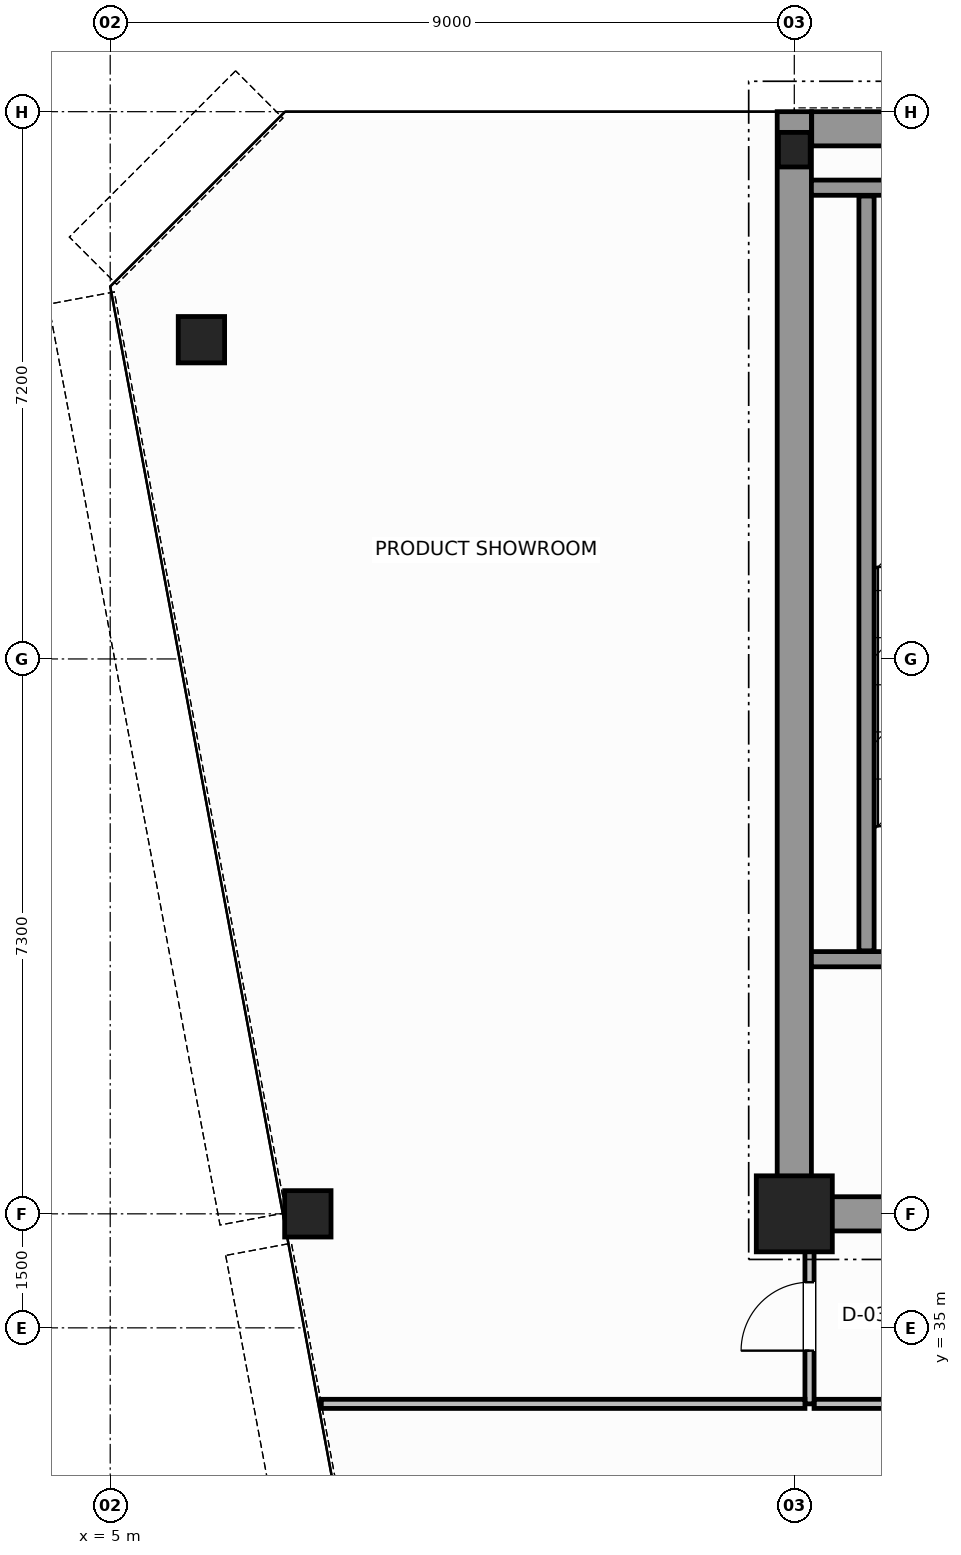
"""IFC4 building model, lengths in metres.
Left out: names, types, materials, properties, quantities, classifications, styles, units other than length and angle.
Written with IfcOpenShell. Run it as: python <this file> out.ifc"""

import sys

from ifc_helpers import new_model, si_unit, direction, frame, frame_2d, origin, origin_2d, place, context, subcontext, project, spatial, rectangle, hollow_circle, i_section, extrude, source, transform, mapped, element, fill, save


model = new_model("IFC4")
c1 = context("Model", 3, precision=1e-05, world=origin(), true_north=direction((0.0, 1.0)))
c2 = subcontext(c1, "Body", "Model", "MODEL_VIEW")
j1 = project(units=[si_unit("LENGTHUNIT", "METRE"), si_unit("PLANEANGLEUNIT", "RADIAN")], contexts=[c1])
p1 = place(None, origin())
s1 = spatial("IfcSite", under=j1, at=p1, CompositionType="ELEMENT")
p2 = place(p1, origin())
s2 = spatial("IfcBuilding", under=s1, at=p2, CompositionType="ELEMENT")
p3 = place(p2, frame((0.0, 0.0, 257.4)))
s3 = spatial("IfcBuildingStorey", under=s2, at=p3, CompositionType="ELEMENT", Elevation=257.4)
m1 = source(origin(), c2, "Body", "SweptSolid", [
    extrude(rectangle(XDim=1.0, YDim=1.0, at=origin_2d()), origin(), (0.0, 0.0, 1.0), 3.8),
])
p4 = place(p3, frame((14.0, 36.5, 0.0), z_axis=(0.0, 0.0, 1.0), x_axis=(1.0, 0.0, 0.0)))
e1 = element("IfcColumn", 1, at=p4, inside=s3, PredefinedType="COLUMN", context=c2, shape_type="MappedRepresentation", body=[
    mapped(m1, transform((0.0, 0.0, 0.0), scale=1.0)),
])
m2 = source(origin(), c2, "Body", "SweptSolid", [
    extrude(i_section(OverallWidth=0.418, OverallDepth=0.455, WebThickness=0.042, FlangeThickness=0.058, FilletRadius=0.015, at=origin_2d()), origin(), (0.0, 0.0, 1.0), 3.8),
])
p5 = place(p3, frame((14.0, 50.5, 0.0), z_axis=(0.0, 0.0, 1.0), x_axis=(1.0, 0.0, 0.0)))
e2 = element("IfcColumn", 2, at=p5, inside=s3, PredefinedType="COLUMN", context=c2, shape_type="MappedRepresentation", body=[
    mapped(m2, transform((0.0, 0.0, 0.0), scale=1.0)),
])
m3 = source(origin(), c2, "Body", "SweptSolid", [
    extrude(hollow_circle(Radius=0.305, WallThickness=0.03, at=origin_2d()), origin(), (0.0, 0.0, 1.0), 3.8),
])
for number, where, z_axis, x_axis in (
    (3, (6.2, 48.0, 0.0), (0.0, 0.0, 1.0), (1.0, 0.0, 0.0)),
    (4, (7.6, 36.5, 0.0), (0.0, 0.0, 1.0), (1.0, 0.0, 0.0)),
):
    element("IfcColumn", number, at=place(p3, frame(where, z_axis=z_axis, x_axis=x_axis)), inside=s3, PredefinedType="COLUMN", context=c2, shape_type="MappedRepresentation", body=[
        mapped(m3, transform((0.0, 0.0, 0.0), scale=1.0)),
    ])
p6 = place(p3, frame((14.229, 50.775, 0.0), z_axis=(0.0, 0.0, 1.0), x_axis=(1.0, 0.0, 0.0)))
e5 = element("IfcWall", 5, at=p6, inside=s3, PredefinedType="SHEAR", context=c2, shape_type="SweptSolid", body=[
    extrude(rectangle(XDim=19.769, YDim=0.45, at=frame_2d((9.885, 0.0))), origin(), (0.0, 0.0, 1.0), 3.8),
])
p7 = place(p3, frame((14.0, 36.5, 0.0), z_axis=(0.0, 0.0, 1.0), x_axis=(0.0, 1.0, 0.0)))
e6 = element("IfcWall", 6, at=p7, inside=s3, PredefinedType="SHEAR", context=c2, shape_type="SweptSolid", body=[
    extrude(rectangle(XDim=14.5, YDim=0.45, at=frame_2d((7.25, 0.0))), origin(), (0.0, 0.0, 1.0), 3.8),
])
p8 = place(p3, frame((14.245, 36.5, 0.0), z_axis=(0.0, 0.0, 1.0), x_axis=(1.0, 0.0, 0.0)))
e7 = element("IfcWall", 7, at=p8, inside=s3, PredefinedType="SHEAR", context=c2, shape_type="SweptSolid", body=[
    extrude(rectangle(XDim=3.955, YDim=0.45, at=frame_2d((1.978, 0.0))), origin(), (0.0, 0.0, 1.0), 2.58),
])
p9 = place(p3, frame((14.225, 39.85, 0.0), z_axis=(0.0, 0.0, 1.0), x_axis=(1.0, 0.0, 0.0)))
e8 = element("IfcWall", 8, at=p9, inside=s3, PredefinedType="SOLIDWALL", context=c2, shape_type="SweptSolid", body=[
    extrude(rectangle(XDim=4.375, YDim=0.2, at=frame_2d((2.188, 0.0))), origin(), (0.0, 0.0, 1.0), 3.8),
])
p10 = place(p9, frame((1.95, 0.0, 0.0)))
e9 = element("IfcOpeningElement", 9, at=p10, cuts=e8, PredefinedType="OPENING", context=c2, shape_type="SweptSolid", body=[
    extrude(rectangle(XDim=1.1, YDim=2.15, at=frame_2d((0.55, 1.075))), frame((0.0, 0.11, 0.0), z_axis=(0.0, -1.0, 0.0), x_axis=(1.0, 0.0, 0.0)), (0.0, 0.0, 1.0), 0.22),
])
p11 = place(p3, frame((14.225, 50.0, 0.0), z_axis=(0.0, 0.0, 1.0), x_axis=(1.0, 0.0, 0.0)))
e10 = element("IfcWall", 10, at=p11, inside=s3, PredefinedType="SOLIDWALL", context=c2, shape_type="SweptSolid", body=[
    extrude(rectangle(XDim=4.375, YDim=0.2, at=frame_2d((2.188, 0.0))), origin(), (0.0, 0.0, 1.0), 3.8),
])
p12 = place(p3, frame((14.95, 39.96, 0.0), z_axis=(0.0, 0.0, 1.0), x_axis=(0.0, 1.0, 0.0)))
e11 = element("IfcWall", 11, at=p12, inside=s3, PredefinedType="SOLIDWALL", context=c2, shape_type="SweptSolid", body=[
    extrude(rectangle(XDim=9.93, YDim=0.2, at=frame_2d((4.965, 0.0))), origin(), (0.0, 0.0, 1.0), 3.8),
])
p13 = place(p3, frame((14.26, 34.0, 0.0), z_axis=(0.0, 0.0, 1.0), x_axis=(1.0, 0.0, 0.0)))
e12 = element("IfcWall", 12, at=p13, inside=s3, PredefinedType="PARTITIONING", context=c2, shape_type="SweptSolid", body=[
    extrude(rectangle(XDim=19.48, YDim=0.12, at=frame_2d((9.74, 0.0))), origin(), (0.0, 0.0, 1.0), 3.17),
])
p14 = place(p3, frame((14.2, 34.0, 0.0), z_axis=(0.0, 0.0, 1.0), x_axis=(0.0, 1.0, 0.0)))
e13 = element("IfcWall", 13, at=p14, inside=s3, PredefinedType="PARTITIONING", context=c2, shape_type="SweptSolid", body=[
    extrude(rectangle(XDim=2.44, YDim=0.12, at=frame_2d((1.22, 0.0))), origin(), (0.0, 0.0, 1.0), 3.58),
])
p15 = place(p14, frame((0.7, 0.0, 0.0)))
e14 = element("IfcOpeningElement", 14, at=p15, cuts=e13, PredefinedType="OPENING", context=c2, shape_type="SweptSolid", body=[
    extrude(rectangle(XDim=0.9, YDim=2.15, at=frame_2d((0.45, 1.075))), frame((0.0, 0.07, 0.0), z_axis=(0.0, -1.0, 0.0), x_axis=(1.0, 0.0, 0.0)), (0.0, 0.0, 1.0), 0.14),
])
p16 = place(p3, frame((7.777, 34.0, 0.0), z_axis=(0.0, 0.0, 1.0), x_axis=(1.0, 0.0, 0.0)))
e15 = element("IfcWall", 15, at=p16, inside=s3, PredefinedType="PARTITIONING", context=c2, shape_type="SweptSolid", body=[
    extrude(rectangle(XDim=6.363, YDim=0.12, at=frame_2d((3.181, 0.0))), origin(), (0.0, 0.0, 1.0), 3.17),
])
m4 = source(origin(), c2, "Body", "SweptSolid", [
    extrude(rectangle(XDim=0.9, YDim=2.15, at=frame_2d((0.45, 1.075))), frame((0.0, 0.025, 0.0), z_axis=(0.0, -1.0, 0.0), x_axis=(1.0, 0.0, 0.0)), (0.0, 0.0, 1.0), 0.05),
])
p17 = place(p15, origin())
e16 = element("IfcDoor", 16, at=p17, inside=s3, OperationType="SINGLE_SWING_LEFT", PredefinedType="DOOR", context=c2, shape_type="MappedRepresentation", body=[
    mapped(m4, transform((0.0, 0.0, 0.0), scale=1.0)),
])
fill(e14, e16)
save(model, sys.argv[1])
